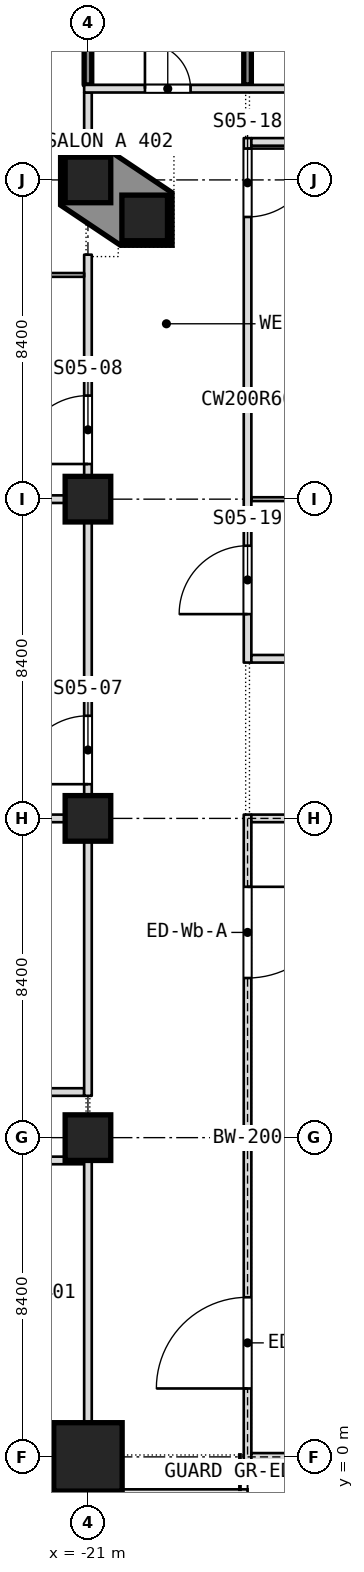
"""IFC4 building model, lengths in metres.
Left out: names, types, materials, properties, quantities, classifications, styles, units other than length and angle.
Written with IfcOpenShell. Run it as: python <this file> out.ifc"""

import sys

from ifc_helpers import new_model, si_unit, direction, frame, frame_2d, origin, origin_2d, place, context, subcontext, project, spatial, polyline, rectangle, outline, extrude, element, fill, save


model = new_model("IFC4")
c1 = context("Model", 3, precision=1e-05, world=origin(), true_north=direction((0.0, 1.0)))
c2 = subcontext(c1, "Body", "Model", "MODEL_VIEW")
j1 = project(units=[si_unit("LENGTHUNIT", "METRE"), si_unit("PLANEANGLEUNIT", "RADIAN")], contexts=[c1])
p1 = place(None, origin())
s1 = spatial("IfcSite", under=j1, at=p1, CompositionType="ELEMENT")
p2 = place(p1, origin())
s2 = spatial("IfcBuilding", under=s1, at=p2, CompositionType="ELEMENT")
p3 = place(p2, frame((0.0, 0.0, 26.0)))
s3 = spatial("IfcBuildingStorey", under=s2, at=p3, CompositionType="ELEMENT", Elevation=26.0)
p4 = place(p3, frame((-21.0, 0.0, 0.0), z_axis=(0.0, 0.0, 1.0), x_axis=(1.0, 0.0, 0.0)))
e1 = element("IfcColumn", 1, at=p4, inside=s3, PredefinedType="COLUMN", context=c2, shape_type="SweptSolid", body=[
    extrude(rectangle(XDim=1.8, YDim=1.8, at=origin_2d()), origin(), (0.0, 0.0, 1.0), 5.0),
])
for number, where, z_axis, x_axis in (
    (2, (-21.0, 8.4, 0.0), (0.0, 0.0, 1.0), (1.0, 0.0, 0.0)),
    (3, (-21.0, 16.8, 0.0), (0.0, 0.0, 1.0), (1.0, 0.0, 0.0)),
    (4, (-21.0, 25.2, 0.0), (0.0, 0.0, 1.0), (1.0, 0.0, 0.0)),
    (5, (-21.0, 33.6, 0.0), (0.0, 0.0, 1.0), (1.0, 0.0, 0.0)),
    (6, (-19.507, 32.6, 0.0), (0.0, 0.0, 1.0), (1.0, 0.0, 0.0)),
):
    element("IfcColumn", number, at=place(p3, frame(where, z_axis=z_axis, x_axis=x_axis)), inside=s3, PredefinedType="COLUMN", context=c2, shape_type="SweptSolid", body=[
        extrude(rectangle(XDim=1.2, YDim=1.2, at=origin_2d()), origin(), (0.0, 0.0, 1.0), 5.0),
    ])
p5 = place(p3, frame((-38.384, 7.8, 0.0), z_axis=(0.0, 0.0, 1.0), x_axis=(1.0, 0.0, 0.0)))
e7 = element("IfcWall", 7, at=p5, inside=s3, PredefinedType="PARTITIONING", context=c2, shape_type="SweptSolid", body=[
    extrude(rectangle(XDim=17.284, YDim=0.2, at=frame_2d((8.642, 0.0))), origin(), (0.0, 0.0, 1.0), 4.68),
])
p6 = place(p5, frame((12.609, 0.0, 0.0)))
e8 = element("IfcOpeningElement", 8, at=p6, cuts=e7, PredefinedType="OPENING", context=c2, shape_type="SweptSolid", body=[
    extrude(rectangle(XDim=1.0, YDim=2.1, at=frame_2d((0.5, 1.05))), frame((0.0, 0.1, 0.0), z_axis=(0.0, -1.0, 0.0), x_axis=(1.0, 0.0, 0.0)), (0.0, 0.0, 1.0), 0.2),
])
p7 = place(p3, frame((-27.4, 9.6, 0.0), z_axis=(0.0, 0.0, 1.0), x_axis=(1.0, 0.0, 0.0)))
e9 = element("IfcWall", 9, at=p7, inside=s3, PredefinedType="PARTITIONING", context=c2, shape_type="SweptSolid", body=[
    extrude(rectangle(XDim=6.3, YDim=0.2, at=frame_2d((3.15, 0.0))), origin(), (0.0, 0.0, 1.0), 4.68),
])
p8 = place(p7, frame((2.65, 0.0, 0.0)))
e10 = element("IfcOpeningElement", 10, at=p8, cuts=e9, PredefinedType="OPENING", context=c2, shape_type="SweptSolid", body=[
    extrude(rectangle(XDim=1.0, YDim=2.1, at=frame_2d((0.5, 1.05))), frame((0.0, 0.1, 0.0), z_axis=(0.0, -1.0, 0.0), x_axis=(1.0, 0.0, 0.0)), (0.0, 0.0, 1.0), 0.2),
])
p9 = place(p3, frame((-16.8, 20.9, 0.0), z_axis=(0.0, 0.0, 1.0), x_axis=(0.0, 1.0, 0.0)))
e11 = element("IfcWall", 11, at=p9, inside=s3, PredefinedType="PARTITIONING", context=c2, shape_type="SweptSolid", body=[
    extrude(rectangle(XDim=13.8, YDim=0.2, at=frame_2d((6.9, 0.0))), origin(), (0.0, 0.0, 1.0), 4.68),
])
p10 = place(p9, frame((11.725, 0.0, 0.0)))
e12 = element("IfcOpeningElement", 12, at=p10, cuts=e11, PredefinedType="OPENING", context=c2, shape_type="SweptSolid", body=[
    extrude(rectangle(XDim=1.8, YDim=2.1, at=frame_2d((0.9, 1.05))), frame((0.0, 0.1, 0.0), z_axis=(0.0, -1.0, 0.0), x_axis=(1.0, 0.0, 0.0)), (0.0, 0.0, 1.0), 0.2),
])
p11 = place(p9, frame((1.275, 0.0, 0.0)))
e13 = element("IfcOpeningElement", 13, at=p11, cuts=e11, PredefinedType="OPENING", context=c2, shape_type="SweptSolid", body=[
    extrude(rectangle(XDim=1.8, YDim=2.1, at=frame_2d((0.9, 1.05))), frame((0.0, 0.1, 0.0), z_axis=(0.0, -1.0, 0.0), x_axis=(1.0, 0.0, 0.0)), (0.0, 0.0, 1.0), 0.2),
])
p12 = place(p3, frame((-16.8, 36.1, 0.0), z_axis=(0.0, 0.0, 1.0), x_axis=(0.0, 1.0, 0.0)))
e14 = element("IfcWall", 14, at=p12, inside=s3, PredefinedType="PARTITIONING", context=c2, shape_type="SweptSolid", body=[
    extrude(rectangle(XDim=6.484, YDim=0.2, at=frame_2d((3.242, 0.0))), origin(), (0.0, 0.0, 1.0), 4.68),
])
p13 = place(p3, frame((-27.63, 16.8, 0.0), z_axis=(0.0, 0.0, 1.0), x_axis=(1.0, 0.0, 0.0)))
e15 = element("IfcWall", 15, at=p13, inside=s3, PredefinedType="PARTITIONING", context=c2, shape_type="SweptSolid", body=[
    extrude(rectangle(XDim=6.53, YDim=0.2, at=frame_2d((3.265, 0.0))), origin(), (0.0, 0.0, 1.0), 4.68),
])
p14 = place(p3, frame((-21.0, -0.884, 0.0), z_axis=(0.0, 0.0, 1.0), x_axis=(0.0, 1.0, 0.0)))
e16 = element("IfcWall", 16, at=p14, inside=s3, PredefinedType="PARTITIONING", context=c2, shape_type="SweptSolid", body=[
    extrude(rectangle(XDim=8.784, YDim=0.2, at=frame_2d((4.392, 0.0))), origin(), (0.0, 0.0, 1.0), 4.68),
])
p15 = place(p3, frame((-21.0, 9.5, 0.0), z_axis=(0.0, 0.0, 1.0), x_axis=(0.0, 1.0, 0.0)))
e17 = element("IfcWall", 17, at=p15, inside=s3, PredefinedType="PARTITIONING", context=c2, shape_type="SweptSolid", body=[
    extrude(rectangle(XDim=22.133, YDim=0.2, at=frame_2d((11.066, 0.0))), origin(), (0.0, 0.0, 1.0), 4.68),
])
p16 = place(p15, frame((8.2, 0.0, 0.0)))
e18 = element("IfcOpeningElement", 18, at=p16, cuts=e17, PredefinedType="OPENING", context=c2, shape_type="SweptSolid", body=[
    extrude(rectangle(XDim=1.8, YDim=2.1, at=frame_2d((0.9, 1.05))), frame((0.0, 0.1, 0.0), z_axis=(0.0, -1.0, 0.0), x_axis=(1.0, 0.0, 0.0)), (0.0, 0.0, 1.0), 0.2),
])
p17 = place(p15, frame((16.625, 0.0, 0.0)))
e19 = element("IfcOpeningElement", 19, at=p17, cuts=e17, PredefinedType="OPENING", context=c2, shape_type="SweptSolid", body=[
    extrude(rectangle(XDim=1.8, YDim=2.1, at=frame_2d((0.9, 1.05))), frame((0.0, 0.1, 0.0), z_axis=(0.0, -1.0, 0.0), x_axis=(1.0, 0.0, 0.0)), (0.0, 0.0, 1.0), 0.2),
])
p18 = place(p3, frame((-21.0, 34.567, 0.0), z_axis=(0.0, 0.0, 1.0), x_axis=(0.0, 1.0, 0.0)))
e20 = element("IfcWall", 20, at=p18, inside=s3, PredefinedType="PARTITIONING", context=c2, shape_type="SweptSolid", body=[
    extrude(rectangle(XDim=1.333, YDim=0.2, at=frame_2d((0.667, 0.0))), origin(), (0.0, 0.0, 1.0), 4.68),
])
p19 = place(p3, frame((-21.0, 36.1, 0.0), z_axis=(0.0, 0.0, 1.0), x_axis=(0.0, 1.0, 0.0)))
e21 = element("IfcWall", 21, at=p19, inside=s3, PredefinedType="PARTITIONING", context=c2, shape_type="SweptSolid", body=[
    extrude(rectangle(XDim=6.484, YDim=0.2, at=frame_2d((3.242, 0.0))), origin(), (0.0, 0.0, 1.0), 4.68),
])
p20 = place(p3, frame((-16.7, 21.0, 0.0), z_axis=(0.0, 0.0, 1.0), x_axis=(1.0, 0.0, 0.0)))
e22 = element("IfcWall", 22, at=p20, inside=s3, PredefinedType="PARTITIONING", context=c2, shape_type="SweptSolid", body=[
    extrude(rectangle(XDim=33.4, YDim=0.2, at=frame_2d((16.7, 0.0))), origin(), (0.0, 0.0, 1.0), 4.68),
])
p21 = place(p20, frame((15.8, 0.0, 0.0)))
e23 = element("IfcOpeningElement", 23, at=p21, cuts=e22, PredefinedType="OPENING", context=c2, shape_type="SweptSolid", body=[
    extrude(rectangle(XDim=1.8, YDim=2.1, at=frame_2d((0.9, 1.05))), frame((0.0, 0.1, 0.0), z_axis=(0.0, -1.0, 0.0), x_axis=(1.0, 0.0, 0.0)), (0.0, 0.0, 1.0), 0.2),
])
p22 = place(p20, frame((26.6, 0.0, 0.0)))
e24 = element("IfcOpeningElement", 24, at=p22, cuts=e22, PredefinedType="OPENING", context=c2, shape_type="SweptSolid", body=[
    extrude(rectangle(XDim=1.0, YDim=2.1, at=frame_2d((0.5, 1.05))), frame((0.0, 0.1, 0.0), z_axis=(0.0, -1.0, 0.0), x_axis=(1.0, 0.0, 0.0)), (0.0, 0.0, 1.0), 0.2),
])
p23 = place(p3, frame((-27.865, 25.2, 0.0), z_axis=(0.0, 0.0, 1.0), x_axis=(1.0, 0.0, 0.0)))
e25 = element("IfcWall", 25, at=p23, inside=s3, PredefinedType="PARTITIONING", context=c2, shape_type="SweptSolid", body=[
    extrude(rectangle(XDim=6.765, YDim=0.2, at=frame_2d((3.382, 0.0))), origin(), (0.0, 0.0, 1.0), 4.68),
])
p24 = place(p3, frame((-16.7, 25.2, 0.0), z_axis=(0.0, 0.0, 1.0), x_axis=(1.0, 0.0, 0.0)))
e26 = element("IfcWall", 26, at=p24, inside=s3, PredefinedType="PARTITIONING", context=c2, shape_type="SweptSolid", body=[
    extrude(rectangle(XDim=3.48, YDim=0.1, at=frame_2d((1.74, 0.0))), origin(), (0.0, 0.0, 1.0), 4.68),
])
p25 = place(p3, frame((-25.916, 31.1, 0.0), z_axis=(0.0, 0.0, 1.0), x_axis=(1.0, 0.0, 0.0)))
e27 = element("IfcWall", 27, at=p25, inside=s3, PredefinedType="PARTITIONING", context=c2, shape_type="SweptSolid", body=[
    extrude(rectangle(XDim=4.816, YDim=0.1, at=frame_2d((2.408, 0.0))), origin(), (0.0, 0.0, 1.0), 4.68),
])
p26 = place(p25, frame((0.308, 0.0, 0.0)))
e28 = element("IfcOpeningElement", 28, at=p26, cuts=e27, PredefinedType="OPENING", context=c2, shape_type="SweptSolid", body=[
    extrude(rectangle(XDim=1.8, YDim=2.1, at=frame_2d((0.9, 1.05))), frame((0.0, 0.05, 0.0), z_axis=(0.0, -1.0, 0.0), x_axis=(1.0, 0.0, 0.0)), (0.0, 0.0, 1.0), 0.1),
])
p27 = place(p3, frame((-16.7, 34.6, 0.0), z_axis=(0.0, 0.0, 1.0), x_axis=(1.0, 0.0, 0.0)))
e29 = element("IfcWall", 29, at=p27, inside=s3, PredefinedType="PARTITIONING", context=c2, shape_type="SweptSolid", body=[
    extrude(rectangle(XDim=3.38, YDim=0.2, at=frame_2d((1.69, 0.0))), origin(), (0.0, 0.0, 1.0), 4.68),
])
p28 = place(p3, frame((-21.1, 36.0, 0.0), z_axis=(0.0, 0.0, 1.0), x_axis=(1.0, 0.0, 0.0)))
e30 = element("IfcWall", 30, at=p28, inside=s3, PredefinedType="PARTITIONING", context=c2, shape_type="SweptSolid", body=[
    extrude(rectangle(XDim=23.3, YDim=0.2, at=frame_2d((11.65, 0.0))), origin(), (0.0, 0.0, 1.0), 4.68),
])
p29 = place(p28, frame((1.6, 0.0, 0.0)))
e31 = element("IfcOpeningElement", 31, at=p29, cuts=e30, PredefinedType="OPENING", context=c2, shape_type="SweptSolid", body=[
    extrude(rectangle(XDim=1.2, YDim=2.1, at=frame_2d((0.6, 1.05))), frame((0.0, 0.1, 0.0), z_axis=(0.0, -1.0, 0.0), x_axis=(1.0, 0.0, 0.0)), (0.0, 0.0, 1.0), 0.2),
])
p30 = place(p28, frame((11.15, 0.0, 0.0)))
e32 = element("IfcOpeningElement", 32, at=p30, cuts=e30, PredefinedType="OPENING", context=c2, shape_type="SweptSolid", body=[
    extrude(rectangle(XDim=1.0, YDim=2.1, at=frame_2d((0.5, 1.05))), frame((0.0, 0.1, 0.0), z_axis=(0.0, -1.0, 0.0), x_axis=(1.0, 0.0, 0.0)), (0.0, 0.0, 1.0), 0.2),
])
p31 = place(p28, frame((10.05, 0.0, 0.0)))
e33 = element("IfcOpeningElement", 33, at=p31, cuts=e30, PredefinedType="OPENING", context=c2, shape_type="SweptSolid", body=[
    extrude(rectangle(XDim=1.0, YDim=2.1, at=frame_2d((0.5, 1.05))), frame((0.0, 0.1, 0.0), z_axis=(0.0, -1.0, 0.0), x_axis=(1.0, 0.0, 0.0)), (0.0, 0.0, 1.0), 0.2),
])
p32 = place(p28, frame((20.5, 0.0, 0.0)))
e34 = element("IfcOpeningElement", 34, at=p32, cuts=e30, PredefinedType="OPENING", context=c2, shape_type="SweptSolid", body=[
    extrude(rectangle(XDim=1.2, YDim=2.1, at=frame_2d((0.6, 1.05))), frame((0.0, 0.1, 0.0), z_axis=(0.0, -1.0, 0.0), x_axis=(1.0, 0.0, 0.0)), (0.0, 0.0, 1.0), 0.2),
])
p33 = place(p3, frame((-16.8, -0.1, 0.0), z_axis=(0.0, 0.0, 1.0), x_axis=(0.0, 1.0, 0.0)))
e35 = element("IfcWall", 35, at=p33, inside=s3, PredefinedType="PARTITIONING", context=c2, shape_type="SweptSolid", body=[
    extrude(rectangle(XDim=17.0, YDim=0.2, at=frame_2d((8.5, 0.0))), origin(), (0.0, 0.0, 1.0), 4.8),
])
p34 = place(p33, frame((1.9, 0.0, 0.0)))
e36 = element("IfcOpeningElement", 36, at=p34, cuts=e35, PredefinedType="OPENING", context=c2, shape_type="SweptSolid", body=[
    extrude(rectangle(XDim=2.4, YDim=2.1, at=frame_2d((1.2, 1.05))), frame((0.0, 0.1, 0.0), z_axis=(0.0, -1.0, 0.0), x_axis=(1.0, 0.0, 0.0)), (0.0, 0.0, 1.0), 0.2),
])
p35 = place(p33, frame((12.7, 0.0, 0.0)))
e37 = element("IfcOpeningElement", 37, at=p35, cuts=e35, PredefinedType="OPENING", context=c2, shape_type="SweptSolid", body=[
    extrude(rectangle(XDim=2.4, YDim=2.1, at=frame_2d((1.2, 1.05))), frame((0.0, 0.1, 0.0), z_axis=(0.0, -1.0, 0.0), x_axis=(1.0, 0.0, 0.0)), (0.0, 0.0, 1.0), 0.2),
])
for number, where, z_axis, x_axis in (
    (38, (-16.7, 0.0, 0.0), (0.0, 0.0, 1.0), (1.0, 0.0, 0.0)),
    (39, (-16.7, 16.8, 0.0), (0.0, 0.0, 1.0), (1.0, 0.0, 0.0)),
):
    element("IfcWall", number, at=place(p3, frame(where, z_axis=z_axis, x_axis=x_axis)), inside=s3, PredefinedType="PARTITIONING", context=c2, shape_type="SweptSolid", body=[
        extrude(rectangle(XDim=4.1, YDim=0.2, at=frame_2d((2.05, 0.0))), origin(), (0.0, 0.0, 1.0), 4.8),
    ])
p36 = place(p3, origin())
e40 = element("IfcWall", 40, at=p36, inside=s3, PredefinedType="SOLIDWALL", context=c2, shape_type="SweptSolid", body=[
    extrude(outline(polyline([(-21.72, 34.32), (-20.364, 34.32), (-18.787, 33.264), (-18.787, 31.88), (-20.143, 31.88), (-21.72, 32.936), (-21.72, 34.32)]), holes=[polyline([(-18.907, 32.0), (-18.907, 33.2), (-20.107, 33.2), (-20.107, 32.0), (-18.907, 32.0)]), polyline([(-20.4, 33.0), (-20.4, 34.2), (-21.6, 34.2), (-21.6, 33.0), (-20.4, 33.0)])]), origin(), (0.0, 0.0, 1.0), 5.0),
])
p37 = place(p29, origin())
e41 = element("IfcDoor", 41, at=p37, inside=s3, OperationType="SINGLE_SWING_RIGHT", PredefinedType="DOOR", context=c2, shape_type="SweptSolid", body=[
    extrude(rectangle(XDim=1.2, YDim=2.1, at=frame_2d((0.6, 1.05))), frame((0.0, 0.025, 0.0), z_axis=(0.0, -1.0, 0.0), x_axis=(1.0, 0.0, 0.0)), (0.0, 0.0, 1.0), 0.05),
])
fill(e31, e41)
p38 = place(p16, origin())
e42 = element("IfcDoor", 42, at=p38, inside=s3, OperationType="DOUBLE_DOOR_SINGLE_SWING", PredefinedType="DOOR", context=c2, shape_type="SweptSolid", body=[
    extrude(rectangle(XDim=1.8, YDim=2.1, at=frame_2d((0.9, 1.05))), frame((0.0, 0.025, 0.0), z_axis=(0.0, -1.0, 0.0), x_axis=(1.0, 0.0, 0.0)), (0.0, 0.0, 1.0), 0.05),
])
fill(e18, e42)
p39 = place(p17, origin())
e43 = element("IfcDoor", 43, at=p39, inside=s3, OperationType="DOUBLE_DOOR_SINGLE_SWING", PredefinedType="DOOR", context=c2, shape_type="SweptSolid", body=[
    extrude(rectangle(XDim=1.8, YDim=2.1, at=frame_2d((0.9, 1.05))), frame((0.0, 0.025, 0.0), z_axis=(0.0, -1.0, 0.0), x_axis=(1.0, 0.0, 0.0)), (0.0, 0.0, 1.0), 0.05),
])
fill(e19, e43)
p40 = place(p10, origin())
e44 = element("IfcDoor", 44, at=p40, inside=s3, OperationType="DOUBLE_DOOR_SINGLE_SWING", PredefinedType="DOOR", context=c2, shape_type="SweptSolid", body=[
    extrude(rectangle(XDim=1.8, YDim=2.1, at=frame_2d((0.9, 1.05))), frame((0.0, 0.025, 0.0), z_axis=(0.0, -1.0, 0.0), x_axis=(1.0, 0.0, 0.0)), (0.0, 0.0, 1.0), 0.05),
])
fill(e12, e44)
p41 = place(p11, origin())
e45 = element("IfcDoor", 45, at=p41, inside=s3, OperationType="DOUBLE_DOOR_SINGLE_SWING", PredefinedType="DOOR", context=c2, shape_type="SweptSolid", body=[
    extrude(rectangle(XDim=1.8, YDim=2.1, at=frame_2d((0.9, 1.05))), frame((0.0, 0.025, 0.0), z_axis=(0.0, -1.0, 0.0), x_axis=(1.0, 0.0, 0.0)), (0.0, 0.0, 1.0), 0.05),
])
fill(e13, e45)
p42 = place(p34, origin())
e46 = element("IfcDoor", 46, at=p42, inside=s3, OperationType="DOUBLE_DOOR_SINGLE_SWING", PredefinedType="DOOR", context=c2, shape_type="SweptSolid", body=[
    extrude(rectangle(XDim=2.4, YDim=2.1, at=frame_2d((1.2, 1.05))), frame((0.0, 0.025, 0.0), z_axis=(0.0, -1.0, 0.0), x_axis=(1.0, 0.0, 0.0)), (0.0, 0.0, 1.0), 0.05),
])
fill(e36, e46)
p43 = place(p35, origin())
e47 = element("IfcDoor", 47, at=p43, inside=s3, OperationType="DOUBLE_DOOR_SINGLE_SWING", PredefinedType="DOOR", context=c2, shape_type="SweptSolid", body=[
    extrude(rectangle(XDim=2.4, YDim=2.1, at=frame_2d((1.2, 1.05))), frame((0.0, 0.025, 0.0), z_axis=(0.0, -1.0, 0.0), x_axis=(1.0, 0.0, 0.0)), (0.0, 0.0, 1.0), 0.05),
])
fill(e37, e47)
save(model, sys.argv[1])
